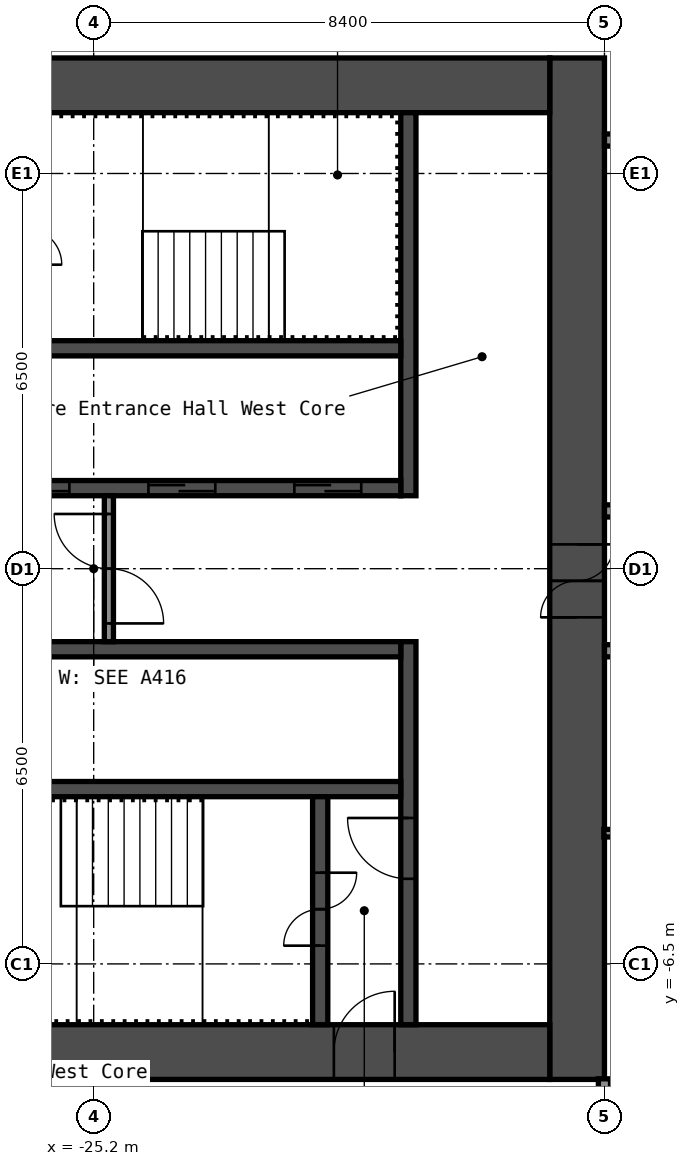
"""IFC4 building model, lengths in metres.
Left out: names, types, materials, properties, quantities, classifications, styles, units other than length and angle.
Written with IfcOpenShell. Run it as: python <this file> out.ifc"""

import sys

from ifc_helpers import new_model, si_unit, direction, frame, frame_2d, origin, place, context, subcontext, project, spatial, rectangle, extrude, element, fill, save


model = new_model("IFC4")
c1 = context("Model", 3, precision=1e-05, world=origin(), true_north=direction((0.0, 1.0)))
c2 = subcontext(c1, "Body", "Model", "MODEL_VIEW")
j1 = project(units=[si_unit("LENGTHUNIT", "METRE"), si_unit("PLANEANGLEUNIT", "RADIAN")], contexts=[c1])
p1 = place(None, origin())
s1 = spatial("IfcSite", under=j1, at=p1, CompositionType="ELEMENT")
p2 = place(p1, origin())
s2 = spatial("IfcBuilding", under=s1, at=p2, CompositionType="ELEMENT")
p3 = place(p2, frame((0.0, 0.0, 110.6)))
s3 = spatial("IfcBuildingStorey", under=s2, at=p3, CompositionType="ELEMENT", Elevation=110.6)
p4 = place(p3, frame((-17.25, -8.4, 0.0), z_axis=(0.0, 0.0, 1.0), x_axis=(0.0, 1.0, 0.0)))
e1 = element("IfcWall", 1, at=p4, inside=s3, PredefinedType="SHEAR", context=c2, shape_type="SweptSolid", body=[
    extrude(rectangle(XDim=16.8, YDim=0.9, at=frame_2d((8.4, 0.0))), origin(), (0.0, 0.0, 1.0), 2.8),
])
p5 = place(p4, frame((7.6, 0.0, 0.0)))
e2 = element("IfcOpeningElement", 2, at=p5, cuts=e1, PredefinedType="OPENING", context=c2, shape_type="SweptSolid", body=[
    extrude(rectangle(XDim=1.2, YDim=2.1, at=frame_2d((0.6, 1.05))), frame((0.0, 0.46, 0.0), z_axis=(0.0, -1.0, 0.0), x_axis=(1.0, 0.0, 0.0)), (0.0, 0.0, 1.0), 0.92),
])
p6 = place(p3, frame((-32.7, 7.95, 0.0), z_axis=(0.0, 0.0, 1.0), x_axis=(1.0, 0.0, 0.0)))
e3 = element("IfcWall", 3, at=p6, inside=s3, PredefinedType="SHEAR", context=c2, shape_type="SweptSolid", body=[
    extrude(rectangle(XDim=15.0, YDim=0.9, at=frame_2d((7.5, 0.0))), origin(), (0.0, 0.0, 1.0), 2.8),
])
p7 = place(p6, frame((3.4, 0.0, 0.0)))
e4 = element("IfcOpeningElement", 4, at=p7, cuts=e3, PredefinedType="OPENING", context=c2, shape_type="SweptSolid", body=[
    extrude(rectangle(XDim=1.2, YDim=2.1, at=frame_2d((0.6, 1.05))), frame((0.0, 0.46, 0.0), z_axis=(0.0, -1.0, 0.0), x_axis=(1.0, 0.0, 0.0)), (0.0, 0.0, 1.0), 0.92),
])
p8 = place(p6, frame((0.75, 0.0, 0.0)))
e5 = element("IfcOpeningElement", 5, at=p8, cuts=e3, PredefinedType="OPENING", context=c2, shape_type="SweptSolid", body=[
    extrude(rectangle(XDim=0.9, YDim=2.1, at=frame_2d((0.45, 1.05))), frame((0.0, 0.46, 0.0), z_axis=(0.0, -1.0, 0.0), x_axis=(1.0, 0.0, 0.0)), (0.0, 0.0, 1.0), 0.92),
])
p9 = place(p3, frame((-32.7, -7.95, 0.0), z_axis=(0.0, 0.0, 1.0), x_axis=(1.0, 0.0, 0.0)))
e6 = element("IfcWall", 6, at=p9, inside=s3, PredefinedType="SHEAR", context=c2, shape_type="SweptSolid", body=[
    extrude(rectangle(XDim=15.0, YDim=0.9, at=frame_2d((7.5, 0.0))), origin(), (0.0, 0.0, 1.0), 2.8),
])
p10 = place(p9, frame((11.45, 0.0, 0.0)))
e7 = element("IfcOpeningElement", 7, at=p10, cuts=e6, PredefinedType="OPENING", context=c2, shape_type="SweptSolid", body=[
    extrude(rectangle(XDim=1.0, YDim=2.1, at=frame_2d((0.5, 1.05))), frame((0.0, 0.46, 0.0), z_axis=(0.0, -1.0, 0.0), x_axis=(1.0, 0.0, 0.0)), (0.0, 0.0, 1.0), 0.92),
])
p11 = place(p3, frame((-20.025, 1.2, 0.0), z_axis=(0.0, 0.0, 1.0), x_axis=(0.0, 1.0, 0.0)))
e8 = element("IfcWall", 8, at=p11, inside=s3, PredefinedType="SHEAR", context=c2, shape_type="SweptSolid", body=[
    extrude(rectangle(XDim=6.3, YDim=0.25, at=frame_2d((3.15, 0.0))), origin(), (0.0, 0.0, 1.0), 2.8),
])
p12 = place(p3, frame((-20.025, -7.5, 0.0), z_axis=(0.0, 0.0, 1.0), x_axis=(0.0, 1.0, 0.0)))
e9 = element("IfcWall", 9, at=p12, inside=s3, PredefinedType="SHEAR", context=c2, shape_type="SweptSolid", body=[
    extrude(rectangle(XDim=6.3, YDim=0.25, at=frame_2d((3.15, 0.0))), origin(), (0.0, 0.0, 1.0), 2.8),
])
p13 = place(p12, frame((2.4, 0.0, 0.0)))
e10 = element("IfcOpeningElement", 10, at=p13, cuts=e9, PredefinedType="OPENING", context=c2, shape_type="SweptSolid", body=[
    extrude(rectangle(XDim=1.0, YDim=2.1, at=frame_2d((0.5, 1.05))), frame((0.0, 0.135, 0.0), z_axis=(0.0, -1.0, 0.0), x_axis=(1.0, 0.0, 0.0)), (0.0, 0.0, 1.0), 0.27),
])
p14 = place(p3, frame((-27.65, 1.325, 0.0), z_axis=(0.0, 0.0, 1.0), x_axis=(1.0, 0.0, 0.0)))
e11 = element("IfcWall", 11, at=p14, inside=s3, PredefinedType="SHEAR", context=c2, shape_type="SweptSolid", body=[
    extrude(rectangle(XDim=7.5, YDim=0.25, at=frame_2d((3.75, 0.0))), origin(), (0.0, 0.0, 1.0), 2.8),
])
p15 = place(p14, frame((5.75, 0.0, 0.0)))
e12 = element("IfcOpeningElement", 12, at=p15, cuts=e11, PredefinedType="OPENING", context=c2, shape_type="SweptSolid", body=[
    extrude(rectangle(XDim=1.1, YDim=2.1, at=frame_2d((0.55, 1.05))), frame((0.0, 0.135, 0.0), z_axis=(0.0, -1.0, 0.0), x_axis=(1.0, 0.0, 0.0)), (0.0, 0.0, 1.0), 0.27),
])
p16 = place(p14, frame((3.35, 0.0, 0.0)))
e13 = element("IfcOpeningElement", 13, at=p16, cuts=e11, PredefinedType="OPENING", context=c2, shape_type="SweptSolid", body=[
    extrude(rectangle(XDim=1.1, YDim=2.1, at=frame_2d((0.55, 1.05))), frame((0.0, 0.135, 0.0), z_axis=(0.0, -1.0, 0.0), x_axis=(1.0, 0.0, 0.0)), (0.0, 0.0, 1.0), 0.27),
])
p17 = place(p14, frame((0.95, 0.0, 0.0)))
e14 = element("IfcOpeningElement", 14, at=p17, cuts=e11, PredefinedType="OPENING", context=c2, shape_type="SweptSolid", body=[
    extrude(rectangle(XDim=1.1, YDim=2.1, at=frame_2d((0.55, 1.05))), frame((0.0, 0.135, 0.0), z_axis=(0.0, -1.0, 0.0), x_axis=(1.0, 0.0, 0.0)), (0.0, 0.0, 1.0), 0.27),
])
for number, where, z_axis, x_axis in (
    (15, (-27.65, 3.625, 0.0), (0.0, 0.0, 1.0), (1.0, 0.0, 0.0)),
    (16, (-27.65, -1.325, 0.0), (0.0, 0.0, 1.0), (1.0, 0.0, 0.0)),
    (17, (-27.65, -3.625, 0.0), (0.0, 0.0, 1.0), (1.0, 0.0, 0.0)),
):
    element("IfcWall", number, at=place(p3, frame(where, z_axis=z_axis, x_axis=x_axis)), inside=s3, PredefinedType="SHEAR", context=c2, shape_type="SweptSolid", body=[
        extrude(rectangle(XDim=7.5, YDim=0.25, at=frame_2d((3.75, 0.0))), origin(), (0.0, 0.0, 1.0), 2.8),
    ])
p18 = place(p3, frame((-21.475, -7.5, 0.0), z_axis=(0.0, 0.0, 1.0), x_axis=(0.0, 1.0, 0.0)))
e18 = element("IfcWall", 18, at=p18, inside=s3, PredefinedType="SHEAR", context=c2, shape_type="SweptSolid", body=[
    extrude(rectangle(XDim=3.75, YDim=0.25, at=frame_2d((1.875, 0.0))), origin(), (0.0, 0.0, 1.0), 2.8),
])
p19 = place(p18, frame((1.3, 0.0, 0.0)))
e19 = element("IfcOpeningElement", 19, at=p19, cuts=e18, PredefinedType="OPENING", context=c2, shape_type="SweptSolid", body=[
    extrude(rectangle(XDim=1.2, YDim=2.1, at=frame_2d((0.6, 1.05))), frame((0.0, 0.135, 0.0), z_axis=(0.0, -1.0, 0.0), x_axis=(1.0, 0.0, 0.0)), (0.0, 0.0, 1.0), 0.27),
])
p20 = place(p3, frame((-24.95, -1.2, 0.0), z_axis=(0.0, 0.0, 1.0), x_axis=(0.0, 1.0, 0.0)))
e20 = element("IfcWall", 20, at=p20, inside=s3, PredefinedType="PARTITIONING", context=c2, shape_type="SweptSolid", body=[
    extrude(rectangle(XDim=2.4, YDim=0.15, at=frame_2d((1.2, 0.0))), origin(), (0.0, 0.0, 1.0), 2.8),
])
p21 = place(p20, frame((0.3, 0.0, 0.0)))
e21 = element("IfcOpeningElement", 21, at=p21, cuts=e20, PredefinedType="OPENING", context=c2, shape_type="SweptSolid", body=[
    extrude(rectangle(XDim=1.8, YDim=2.1, at=frame_2d((0.9, 1.05))), frame((0.0, 0.085, 0.0), z_axis=(0.0, -1.0, 0.0), x_axis=(1.0, 0.0, 0.0)), (0.0, 0.0, 1.0), 0.17),
])
p22 = place(p3, frame((-16.81, -4.35, 0.0), z_axis=(0.0, 0.0, 1.0), x_axis=(1.0, 0.0, 0.0)))
e22 = element("IfcWall", 22, at=p22, inside=s3, PredefinedType="PARTITIONING", context=c2, shape_type="SweptSolid", body=[
    extrude(rectangle(XDim=2.448, YDim=0.125, at=frame_2d((1.224, 0.0))), origin(), (0.0, 0.0, 1.0), 2.8),
])
p23 = place(p3, frame((-16.8, -1.35, 0.0), z_axis=(0.0, 0.0, 1.0), x_axis=(1.0, 0.0, 0.0)))
e23 = element("IfcWall", 23, at=p23, inside=s3, PredefinedType="PARTITIONING", context=c2, shape_type="SweptSolid", body=[
    extrude(rectangle(XDim=33.6, YDim=0.2, at=frame_2d((16.8, 0.0))), origin(), (0.0, 0.0, 1.0), 2.8),
])
p24 = place(p23, frame((2.85, 0.0, 0.0)))
e24 = element("IfcOpeningElement", 24, at=p24, cuts=e23, PredefinedType="OPENING", context=c2, shape_type="SweptSolid", body=[
    extrude(rectangle(XDim=1.0, YDim=2.1, at=frame_2d((0.5, 1.05))), frame((0.0, 0.11, 0.0), z_axis=(0.0, -1.0, 0.0), x_axis=(1.0, 0.0, 0.0)), (0.0, 0.0, 1.0), 0.22),
])
p25 = place(p23, frame((4.55, 0.0, 0.0)))
e25 = element("IfcOpeningElement", 25, at=p25, cuts=e23, PredefinedType="OPENING", context=c2, shape_type="SweptSolid", body=[
    extrude(rectangle(XDim=1.0, YDim=2.1, at=frame_2d((0.5, 1.05))), frame((0.0, 0.11, 0.0), z_axis=(0.0, -1.0, 0.0), x_axis=(1.0, 0.0, 0.0)), (0.0, 0.0, 1.0), 0.22),
])
p26 = place(p23, frame((11.25, 0.0, 0.0)))
e26 = element("IfcOpeningElement", 26, at=p26, cuts=e23, PredefinedType="OPENING", context=c2, shape_type="SweptSolid", body=[
    extrude(rectangle(XDim=1.0, YDim=2.1, at=frame_2d((0.5, 1.05))), frame((0.0, 0.11, 0.0), z_axis=(0.0, -1.0, 0.0), x_axis=(1.0, 0.0, 0.0)), (0.0, 0.0, 1.0), 0.22),
])
p27 = place(p23, frame((12.95, 0.0, 0.0)))
e27 = element("IfcOpeningElement", 27, at=p27, cuts=e23, PredefinedType="OPENING", context=c2, shape_type="SweptSolid", body=[
    extrude(rectangle(XDim=1.0, YDim=2.1, at=frame_2d((0.5, 1.05))), frame((0.0, 0.11, 0.0), z_axis=(0.0, -1.0, 0.0), x_axis=(1.0, 0.0, 0.0)), (0.0, 0.0, 1.0), 0.22),
])
p28 = place(p23, frame((19.04, 0.0, 0.0)))
e28 = element("IfcOpeningElement", 28, at=p28, cuts=e23, PredefinedType="OPENING", context=c2, shape_type="SweptSolid", body=[
    extrude(rectangle(XDim=0.9, YDim=2.1, at=frame_2d((0.45, 1.05))), frame((0.0, 0.11, 0.0), z_axis=(0.0, -1.0, 0.0), x_axis=(1.0, 0.0, 0.0)), (0.0, 0.0, 1.0), 0.22),
])
p29 = place(p23, frame((23.24, 0.0, 0.0)))
e29 = element("IfcOpeningElement", 29, at=p29, cuts=e23, PredefinedType="OPENING", context=c2, shape_type="SweptSolid", body=[
    extrude(rectangle(XDim=0.9, YDim=2.1, at=frame_2d((0.45, 1.05))), frame((0.0, 0.11, 0.0), z_axis=(0.0, -1.0, 0.0), x_axis=(1.0, 0.0, 0.0)), (0.0, 0.0, 1.0), 0.22),
])
p30 = place(p23, frame((28.05, 0.0, 0.0)))
e30 = element("IfcOpeningElement", 30, at=p30, cuts=e23, PredefinedType="OPENING", context=c2, shape_type="SweptSolid", body=[
    extrude(rectangle(XDim=1.0, YDim=2.1, at=frame_2d((0.5, 1.05))), frame((0.0, 0.11, 0.0), z_axis=(0.0, -1.0, 0.0), x_axis=(1.0, 0.0, 0.0)), (0.0, 0.0, 1.0), 0.22),
])
p31 = place(p23, frame((29.75, 0.0, 0.0)))
e31 = element("IfcOpeningElement", 31, at=p31, cuts=e23, PredefinedType="OPENING", context=c2, shape_type="SweptSolid", body=[
    extrude(rectangle(XDim=1.0, YDim=2.1, at=frame_2d((0.5, 1.05))), frame((0.0, 0.11, 0.0), z_axis=(0.0, -1.0, 0.0), x_axis=(1.0, 0.0, 0.0)), (0.0, 0.0, 1.0), 0.22),
])
p32 = place(p3, frame((-16.8, 0.95, 0.0), z_axis=(0.0, 0.0, 1.0), x_axis=(1.0, 0.0, 0.0)))
e32 = element("IfcWall", 32, at=p32, inside=s3, PredefinedType="PARTITIONING", context=c2, shape_type="SweptSolid", body=[
    extrude(rectangle(XDim=33.6, YDim=0.2, at=frame_2d((16.8, 0.0))), origin(), (0.0, 0.0, 1.0), 2.8),
])
p33 = place(p32, frame((9.88, 0.0, 0.0)))
e33 = element("IfcOpeningElement", 33, at=p33, cuts=e32, PredefinedType="OPENING", context=c2, shape_type="SweptSolid", body=[
    extrude(rectangle(XDim=0.9, YDim=2.1, at=frame_2d((0.45, 1.05))), frame((0.0, 0.11, 0.0), z_axis=(0.0, -1.0, 0.0), x_axis=(1.0, 0.0, 0.0)), (0.0, 0.0, 1.0), 0.22),
])
p34 = place(p32, frame((14.08, 0.0, 0.0)))
e34 = element("IfcOpeningElement", 34, at=p34, cuts=e32, PredefinedType="OPENING", context=c2, shape_type="SweptSolid", body=[
    extrude(rectangle(XDim=0.9, YDim=2.1, at=frame_2d((0.45, 1.05))), frame((0.0, 0.11, 0.0), z_axis=(0.0, -1.0, 0.0), x_axis=(1.0, 0.0, 0.0)), (0.0, 0.0, 1.0), 0.22),
])
p35 = place(p32, frame((26.345, 0.0, 0.0)))
e35 = element("IfcOpeningElement", 35, at=p35, cuts=e32, PredefinedType="OPENING", context=c2, shape_type="SweptSolid", body=[
    extrude(rectangle(XDim=0.9, YDim=2.1, at=frame_2d((0.45, 1.05))), frame((0.0, 0.11, 0.0), z_axis=(0.0, -1.0, 0.0), x_axis=(1.0, 0.0, 0.0)), (0.0, 0.0, 1.0), 0.22),
])
p36 = place(p32, frame((30.545, 0.0, 0.0)))
e36 = element("IfcOpeningElement", 36, at=p36, cuts=e32, PredefinedType="OPENING", context=c2, shape_type="SweptSolid", body=[
    extrude(rectangle(XDim=0.9, YDim=2.1, at=frame_2d((0.45, 1.05))), frame((0.0, 0.11, 0.0), z_axis=(0.0, -1.0, 0.0), x_axis=(1.0, 0.0, 0.0)), (0.0, 0.0, 1.0), 0.22),
])
p37 = place(p3, frame((-16.8, 7.05, 0.0), z_axis=(0.0, 0.0, 1.0), x_axis=(1.0, 0.0, 0.0)))
e37 = element("IfcWall", 37, at=p37, inside=s3, PredefinedType="PARTITIONING", context=c2, shape_type="SweptSolid", body=[
    extrude(rectangle(XDim=33.6, YDim=0.2, at=frame_2d((16.8, 0.0))), origin(), (0.0, 0.0, 1.0), 2.8),
])
p38 = place(p37, frame((1.82, 0.0, 0.0)))
e38 = element("IfcOpeningElement", 38, at=p38, cuts=e37, PredefinedType="OPENING", context=c2, shape_type="SweptSolid", body=[
    extrude(rectangle(XDim=0.9, YDim=2.1, at=frame_2d((0.45, 1.05))), frame((0.0, 0.11, 0.0), z_axis=(0.0, -1.0, 0.0), x_axis=(1.0, 0.0, 0.0)), (0.0, 0.0, 1.0), 0.22),
])
p39 = place(p37, frame((6.02, 0.0, 0.0)))
e39 = element("IfcOpeningElement", 39, at=p39, cuts=e37, PredefinedType="OPENING", context=c2, shape_type="SweptSolid", body=[
    extrude(rectangle(XDim=0.9, YDim=2.1, at=frame_2d((0.45, 1.05))), frame((0.0, 0.11, 0.0), z_axis=(0.0, -1.0, 0.0), x_axis=(1.0, 0.0, 0.0)), (0.0, 0.0, 1.0), 0.22),
])
p40 = place(p37, frame((18.2, 0.0, 0.0)))
e40 = element("IfcOpeningElement", 40, at=p40, cuts=e37, PredefinedType="OPENING", context=c2, shape_type="SweptSolid", body=[
    extrude(rectangle(XDim=0.9, YDim=2.1, at=frame_2d((0.45, 1.05))), frame((0.0, 0.11, 0.0), z_axis=(0.0, -1.0, 0.0), x_axis=(1.0, 0.0, 0.0)), (0.0, 0.0, 1.0), 0.22),
])
p41 = place(p37, frame((22.4, 0.0, 0.0)))
e41 = element("IfcOpeningElement", 41, at=p41, cuts=e37, PredefinedType="OPENING", context=c2, shape_type="SweptSolid", body=[
    extrude(rectangle(XDim=0.9, YDim=2.1, at=frame_2d((0.45, 1.05))), frame((0.0, 0.11, 0.0), z_axis=(0.0, -1.0, 0.0), x_axis=(1.0, 0.0, 0.0)), (0.0, 0.0, 1.0), 0.22),
])
p42 = place(p3, frame((-16.8, -15.55, 0.0), z_axis=(0.0, 0.0, 1.0), x_axis=(0.0, 1.0, 0.0)))
e42 = element("IfcWall", 42, at=p42, inside=s3, PredefinedType="PARTITIONING", context=c2, shape_type="SweptSolid", body=[
    extrude(rectangle(XDim=7.16, YDim=0.2, at=frame_2d((3.58, 0.0))), origin(), (0.0, 0.0, 1.0), 2.8),
])
p43 = place(p5, origin())
e43 = element("IfcDoor", 43, at=p43, inside=s3, OperationType="DOUBLE_DOOR_SINGLE_SWING", PredefinedType="DOOR", context=c2, shape_type="SweptSolid", body=[
    extrude(rectangle(XDim=1.2, YDim=2.1, at=frame_2d((0.6, 1.05))), frame((0.0, 0.025, 0.0), z_axis=(0.0, -1.0, 0.0), x_axis=(1.0, 0.0, 0.0)), (0.0, 0.0, 1.0), 0.05),
])
fill(e2, e43)
p44 = place(p10, origin())
e44 = element("IfcDoor", 44, at=p44, inside=s3, OperationType="SINGLE_SWING_LEFT", PredefinedType="DOOR", context=c2, shape_type="SweptSolid", body=[
    extrude(rectangle(XDim=1.0, YDim=2.1, at=frame_2d((0.5, 1.05))), frame((0.0, 0.025, 0.0), z_axis=(0.0, -1.0, 0.0), x_axis=(1.0, 0.0, 0.0)), (0.0, 0.0, 1.0), 0.05),
])
fill(e7, e44)
p45 = place(p19, origin())
e45 = element("IfcDoor", 45, at=p45, inside=s3, OperationType="DOUBLE_DOOR_SINGLE_SWING", PredefinedType="DOOR", context=c2, shape_type="SweptSolid", body=[
    extrude(rectangle(XDim=1.2, YDim=2.1, at=frame_2d((0.6, 1.05))), frame((0.0, 0.025, 0.0), z_axis=(0.0, -1.0, 0.0), x_axis=(1.0, 0.0, 0.0)), (0.0, 0.0, 1.0), 0.05),
])
fill(e19, e45)
p46 = place(p13, origin())
e46 = element("IfcDoor", 46, at=p46, inside=s3, OperationType="SINGLE_SWING_LEFT", PredefinedType="DOOR", context=c2, shape_type="SweptSolid", body=[
    extrude(rectangle(XDim=1.0, YDim=2.1, at=frame_2d((0.5, 1.05))), frame((0.0, 0.025, 0.0), z_axis=(0.0, -1.0, 0.0), x_axis=(1.0, 0.0, 0.0)), (0.0, 0.0, 1.0), 0.05),
])
fill(e10, e46)
p47 = place(p21, origin())
e47 = element("IfcDoor", 47, at=p47, inside=s3, OperationType="DOUBLE_DOOR_SINGLE_SWING", PredefinedType="DOOR", context=c2, shape_type="SweptSolid", body=[
    extrude(rectangle(XDim=1.8, YDim=2.1, at=frame_2d((0.9, 1.05))), frame((0.0, 0.025, 0.0), z_axis=(0.0, -1.0, 0.0), x_axis=(1.0, 0.0, 0.0)), (0.0, 0.0, 1.0), 0.05),
])
fill(e21, e47)
p48 = place(p15, origin())
e48 = element("IfcDoor", 48, at=p48, inside=s3, OperationType="DOUBLE_DOOR_SLIDING", PredefinedType="DOOR", context=c2, shape_type="SweptSolid", body=[
    extrude(rectangle(XDim=1.1, YDim=2.1, at=frame_2d((0.55, 1.05))), frame((0.0, 0.025, 0.0), z_axis=(0.0, -1.0, 0.0), x_axis=(1.0, 0.0, 0.0)), (0.0, 0.0, 1.0), 0.05),
])
fill(e12, e48)
p49 = place(p16, origin())
e49 = element("IfcDoor", 49, at=p49, inside=s3, OperationType="DOUBLE_DOOR_SLIDING", PredefinedType="DOOR", context=c2, shape_type="SweptSolid", body=[
    extrude(rectangle(XDim=1.1, YDim=2.1, at=frame_2d((0.55, 1.05))), frame((0.0, 0.025, 0.0), z_axis=(0.0, -1.0, 0.0), x_axis=(1.0, 0.0, 0.0)), (0.0, 0.0, 1.0), 0.05),
])
fill(e13, e49)
p50 = place(p17, origin())
e50 = element("IfcDoor", 50, at=p50, inside=s3, OperationType="DOUBLE_DOOR_SLIDING", PredefinedType="DOOR", context=c2, shape_type="SweptSolid", body=[
    extrude(rectangle(XDim=1.1, YDim=2.1, at=frame_2d((0.55, 1.05))), frame((0.0, 0.025, 0.0), z_axis=(0.0, -1.0, 0.0), x_axis=(1.0, 0.0, 0.0)), (0.0, 0.0, 1.0), 0.05),
])
fill(e14, e50)
save(model, sys.argv[1])
